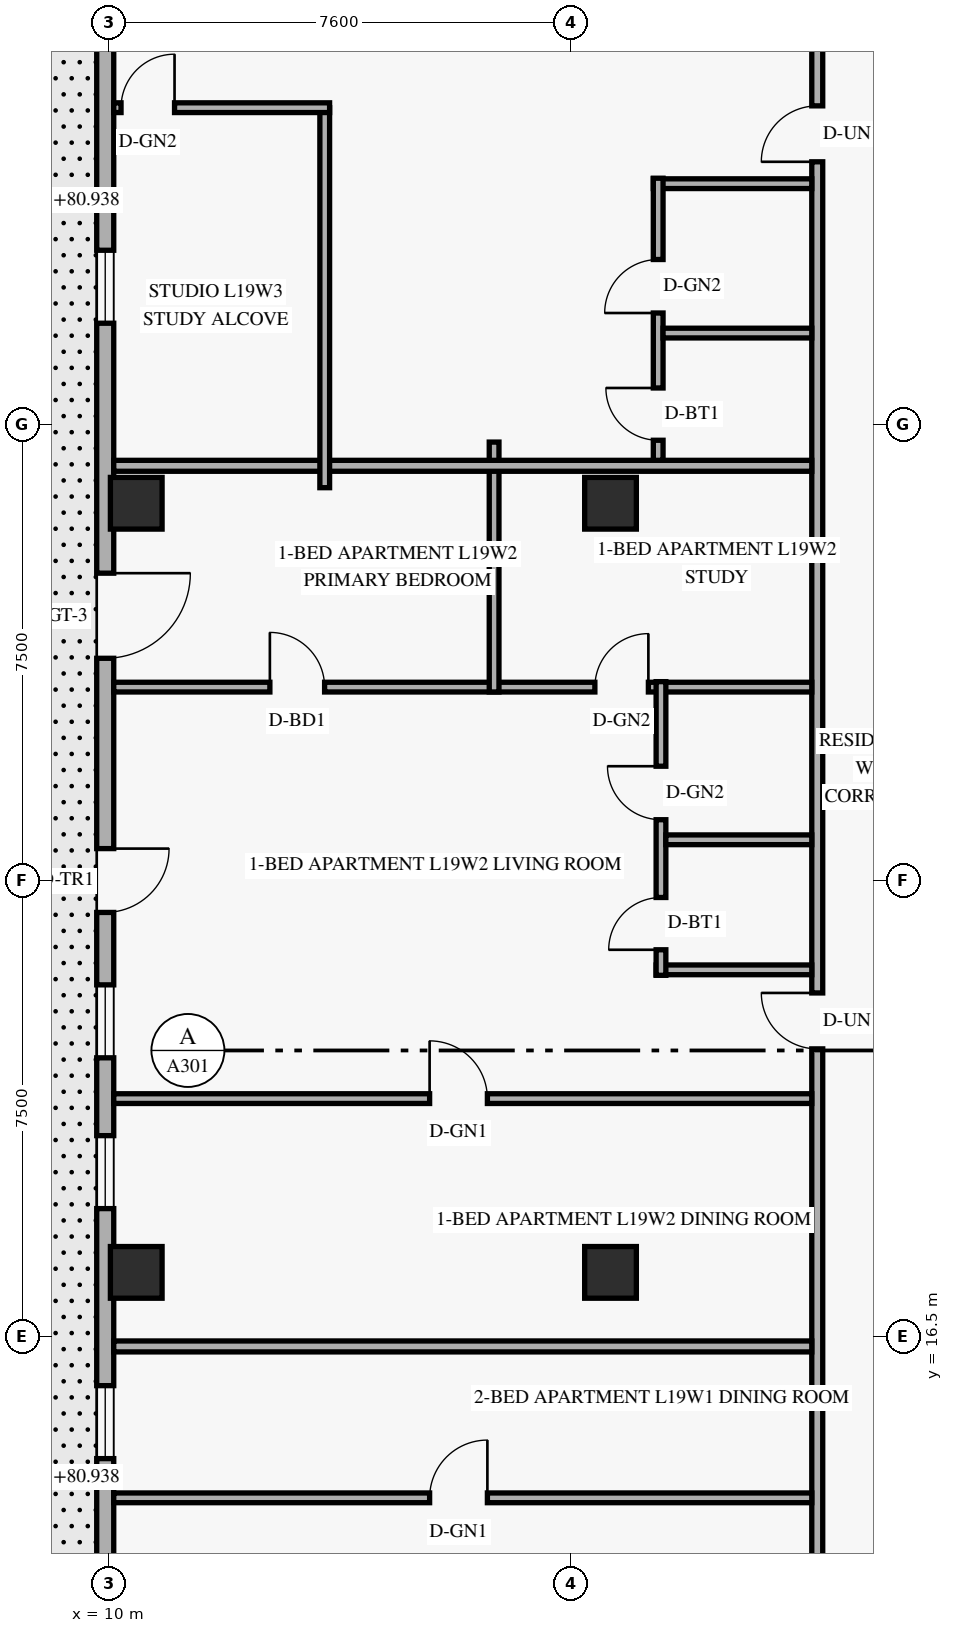
"""IFC4 building model, lengths in metres.
Left out: names, types, materials, properties, quantities, classifications, styles, units other than length and angle.
Written with IfcOpenShell. Run it as: python <this file> out.ifc"""

import sys

from ifc_helpers import new_model, si_unit, direction, frame, frame_2d, origin, origin_2d, place, context, subcontext, project, spatial, rectangle, extrude, element, fill, save


model = new_model("IFC4")
c1 = context("Model", 3, precision=1e-05, world=origin(), true_north=direction((0.0, 1.0)))
c2 = subcontext(c1, "Body", "Model", "MODEL_VIEW")
j1 = project(units=[si_unit("LENGTHUNIT", "METRE"), si_unit("PLANEANGLEUNIT", "RADIAN")], contexts=[c1])
p1 = place(None, origin())
s1 = spatial("IfcSite", under=j1, at=p1, CompositionType="ELEMENT")
p2 = place(p1, origin())
s2 = spatial("IfcBuilding", under=s1, at=p2, CompositionType="ELEMENT")
p3 = place(p2, frame((0.0, 0.0, 76.8)))
s3 = spatial("IfcBuildingStorey", under=s2, at=p3, CompositionType="ELEMENT", Elevation=76.8)
for number, where, z_axis, x_axis in (
    (1, (10.45, 17.55, 0.0), (0.0, 0.0, 1.0), (1.0, 0.0, 0.0)),
    (2, (10.45, 30.2, 0.0), (0.0, 0.0, 1.0), (1.0, 0.0, 0.0)),
    (3, (18.25, 17.55, 0.0), (0.0, 0.0, 1.0), (1.0, 0.0, 0.0)),
    (4, (18.25, 30.2, 0.0), (0.0, 0.0, 1.0), (1.0, 0.0, 0.0)),
):
    element("IfcColumn", number, at=place(p3, frame(where, z_axis=z_axis, x_axis=x_axis)), inside=s3, PredefinedType="COLUMN", context=c2, shape_type="SweptSolid", body=[
        extrude(rectangle(XDim=0.85, YDim=0.85, at=origin_2d()), origin(), (0.0, 0.0, 1.0), 3.6),
    ])
p4 = place(p3, frame((9.94, 41.68, 0.0), z_axis=(0.0, 0.0, 1.0), x_axis=(0.0, -1.0, 0.0)))
e5 = element("IfcWall", 5, at=p4, inside=s3, PredefinedType="SOLIDWALL", context=c2, shape_type="SweptSolid", body=[
    extrude(rectangle(XDim=35.36, YDim=0.28, at=frame_2d((17.68, 0.0))), origin(), (0.0, 0.0, 1.0), 3.36),
])
p5 = place(p4, frame((17.16, 0.0, 0.0)))
e6 = element("IfcOpeningElement", 6, at=p5, cuts=e5, PredefinedType="OPENING", context=c2, shape_type="SweptSolid", body=[
    extrude(rectangle(XDim=1.05, YDim=2.15, at=frame_2d((0.525, 1.075))), frame((0.0, 0.15, 0.0), z_axis=(0.0, -1.0, 0.0), x_axis=(1.0, 0.0, 0.0)), (0.0, 0.0, 1.0), 0.3),
])
p6 = place(p4, frame((12.63, 0.0, 0.0)))
e7 = element("IfcOpeningElement", 7, at=p6, cuts=e5, PredefinedType="OPENING", context=c2, shape_type="SweptSolid", body=[
    extrude(rectangle(XDim=1.4, YDim=2.15, at=frame_2d((0.7, 1.075))), frame((0.0, 0.15, 0.0), z_axis=(0.0, -1.0, 0.0), x_axis=(1.0, 0.0, 0.0)), (0.0, 0.0, 1.0), 0.3),
])
p7 = place(p4, frame((29.314, 0.0, 0.85)))
e8 = element("IfcOpeningElement", 8, at=p7, cuts=e5, PredefinedType="OPENING", context=c2, shape_type="SweptSolid", body=[
    extrude(rectangle(XDim=1.2, YDim=1.5, at=frame_2d((0.6, 0.75))), frame((0.0, 0.15, 0.0), z_axis=(0.0, -1.0, 0.0), x_axis=(1.0, 0.0, 0.0)), (0.0, 0.0, 1.0), 0.3),
])
p8 = place(p4, frame((25.993, 0.0, 0.85)))
e9 = element("IfcOpeningElement", 9, at=p8, cuts=e5, PredefinedType="OPENING", context=c2, shape_type="SweptSolid", body=[
    extrude(rectangle(XDim=1.2, YDim=1.5, at=frame_2d((0.6, 0.75))), frame((0.0, 0.15, 0.0), z_axis=(0.0, -1.0, 0.0), x_axis=(1.0, 0.0, 0.0)), (0.0, 0.0, 1.0), 0.3),
])
p9 = place(p4, frame((21.881, 0.0, 0.85)))
e10 = element("IfcOpeningElement", 10, at=p9, cuts=e5, PredefinedType="OPENING", context=c2, shape_type="SweptSolid", body=[
    extrude(rectangle(XDim=1.2, YDim=1.5, at=frame_2d((0.6, 0.75))), frame((0.0, 0.15, 0.0), z_axis=(0.0, -1.0, 0.0), x_axis=(1.0, 0.0, 0.0)), (0.0, 0.0, 1.0), 0.3),
])
p10 = place(p4, frame((19.401, 0.0, 0.85)))
e11 = element("IfcOpeningElement", 11, at=p10, cuts=e5, PredefinedType="OPENING", context=c2, shape_type="SweptSolid", body=[
    extrude(rectangle(XDim=1.2, YDim=1.5, at=frame_2d((0.6, 0.75))), frame((0.0, 0.15, 0.0), z_axis=(0.0, -1.0, 0.0), x_axis=(1.0, 0.0, 0.0)), (0.0, 0.0, 1.0), 0.3),
])
p11 = place(p4, frame((7.319, 0.0, 0.85)))
e12 = element("IfcOpeningElement", 12, at=p11, cuts=e5, PredefinedType="OPENING", context=c2, shape_type="SweptSolid", body=[
    extrude(rectangle(XDim=1.2, YDim=1.5, at=frame_2d((0.6, 0.75))), frame((0.0, 0.15, 0.0), z_axis=(0.0, -1.0, 0.0), x_axis=(1.0, 0.0, 0.0)), (0.0, 0.0, 1.0), 0.3),
])
p12 = place(p4, frame((0.805, 0.0, 0.85)))
e13 = element("IfcOpeningElement", 13, at=p12, cuts=e5, PredefinedType="OPENING", context=c2, shape_type="SweptSolid", body=[
    extrude(rectangle(XDim=1.2, YDim=1.5, at=frame_2d((0.6, 0.75))), frame((0.0, 0.15, 0.0), z_axis=(0.0, -1.0, 0.0), x_axis=(1.0, 0.0, 0.0)), (0.0, 0.0, 1.0), 0.3),
])
p13 = place(p3, frame((21.65, 2.98, 0.0), z_axis=(0.0, 0.0, 1.0), x_axis=(0.0, 1.0, 0.0)))
e14 = element("IfcWall", 14, at=p13, inside=s3, PredefinedType="STANDARD", context=c2, shape_type="SweptSolid", body=[
    extrude(rectangle(XDim=42.04, YDim=0.18, at=frame_2d((21.02, 0.0))), origin(), (0.0, 0.0, 1.0), 2.731),
])
p14 = place(p13, frame((8.984, 0.0, 0.0)))
e15 = element("IfcOpeningElement", 15, at=p14, cuts=e14, PredefinedType="OPENING", context=c2, shape_type="SweptSolid", body=[
    extrude(rectangle(XDim=0.92, YDim=2.15, at=frame_2d((0.46, 1.075))), frame((0.0, 0.1, 0.0), z_axis=(0.0, -1.0, 0.0), x_axis=(1.0, 0.0, 0.0)), (0.0, 0.0, 1.0), 0.2),
])
p15 = place(p13, frame((18.246, 0.0, 0.0)))
e16 = element("IfcOpeningElement", 16, at=p15, cuts=e14, PredefinedType="OPENING", context=c2, shape_type="SweptSolid", body=[
    extrude(rectangle(XDim=0.92, YDim=2.15, at=frame_2d((0.46, 1.075))), frame((0.0, 0.1, 0.0), z_axis=(0.0, -1.0, 0.0), x_axis=(1.0, 0.0, 0.0)), (0.0, 0.0, 1.0), 0.2),
])
p16 = place(p13, frame((32.836, 0.0, 0.0)))
e17 = element("IfcOpeningElement", 17, at=p16, cuts=e14, PredefinedType="OPENING", context=c2, shape_type="SweptSolid", body=[
    extrude(rectangle(XDim=0.92, YDim=2.15, at=frame_2d((0.46, 1.075))), frame((0.0, 0.1, 0.0), z_axis=(0.0, -1.0, 0.0), x_axis=(1.0, 0.0, 0.0)), (0.0, 0.0, 1.0), 0.2),
])
p17 = place(p3, frame((10.08, 13.842, 0.0), z_axis=(0.0, 0.0, 1.0), x_axis=(1.0, 0.0, 0.0)))
e18 = element("IfcWall", 18, at=p17, inside=s3, PredefinedType="PARTITIONING", context=c2, shape_type="SweptSolid", body=[
    extrude(rectangle(XDim=11.48, YDim=0.16, at=frame_2d((5.74, 0.0))), origin(), (0.0, 0.0, 1.0), 2.731),
])
p18 = place(p17, frame((5.195, 0.0, 0.0)))
e19 = element("IfcOpeningElement", 19, at=p18, cuts=e18, PredefinedType="OPENING", context=c2, shape_type="SweptSolid", body=[
    extrude(rectangle(XDim=0.95, YDim=2.15, at=frame_2d((0.475, 1.075))), frame((0.0, 0.09, 0.0), z_axis=(0.0, -1.0, 0.0), x_axis=(1.0, 0.0, 0.0)), (0.0, 0.0, 1.0), 0.18),
])
p19 = place(p3, frame((10.08, 16.332, 0.0), z_axis=(0.0, 0.0, 1.0), x_axis=(1.0, 0.0, 0.0)))
e20 = element("IfcWall", 20, at=p19, inside=s3, PredefinedType="PARTITIONING", context=c2, shape_type="SweptSolid", body=[
    extrude(rectangle(XDim=11.48, YDim=0.18, at=frame_2d((5.74, 0.0))), origin(), (0.0, 0.0, 1.0), 2.731),
])
p20 = place(p3, frame((10.08, 27.176, 0.0), z_axis=(0.0, 0.0, 1.0), x_axis=(1.0, 0.0, 0.0)))
e21 = element("IfcWall", 21, at=p20, inside=s3, PredefinedType="PARTITIONING", context=c2, shape_type="SweptSolid", body=[
    extrude(rectangle(XDim=11.48, YDim=0.16, at=frame_2d((5.74, 0.0))), origin(), (0.0, 0.0, 1.0), 2.731),
])
p21 = place(p20, frame((7.913, 0.0, 0.0)))
e22 = element("IfcOpeningElement", 22, at=p21, cuts=e21, PredefinedType="OPENING", context=c2, shape_type="SweptSolid", body=[
    extrude(rectangle(XDim=0.88, YDim=2.12, at=frame_2d((0.44, 1.06))), frame((0.0, 0.09, 0.0), z_axis=(0.0, -1.0, 0.0), x_axis=(1.0, 0.0, 0.0)), (0.0, 0.0, 1.0), 0.18),
])
p22 = place(p20, frame((2.568, 0.0, 0.0)))
e23 = element("IfcOpeningElement", 23, at=p22, cuts=e21, PredefinedType="OPENING", context=c2, shape_type="SweptSolid", body=[
    extrude(rectangle(XDim=0.9, YDim=2.14, at=frame_2d((0.45, 1.07))), frame((0.0, 0.09, 0.0), z_axis=(0.0, -1.0, 0.0), x_axis=(1.0, 0.0, 0.0)), (0.0, 0.0, 1.0), 0.18),
])
p23 = place(p3, frame((19.0, 22.526, 0.0), z_axis=(0.0, 0.0, 1.0), x_axis=(1.0, 0.0, 0.0)))
e24 = element("IfcWall", 24, at=p23, inside=s3, PredefinedType="PLUMBINGWALL", context=c2, shape_type="SweptSolid", body=[
    extrude(rectangle(XDim=2.56, YDim=0.16, at=frame_2d((1.28, 0.0))), origin(), (0.0, 0.0, 1.0), 3.36),
])
p24 = place(p3, frame((19.08, 22.436, 0.0), z_axis=(0.0, 0.0, 1.0), x_axis=(0.0, 1.0, 0.0)))
e25 = element("IfcWall", 25, at=p24, inside=s3, PredefinedType="PLUMBINGWALL", context=c2, shape_type="SweptSolid", body=[
    extrude(rectangle(XDim=4.83, YDim=0.16, at=frame_2d((2.415, 0.0))), origin(), (0.0, 0.0, 1.0), 3.36),
])
p25 = place(p24, frame((0.42, 0.0, 0.0)))
e26 = element("IfcOpeningElement", 26, at=p25, cuts=e25, PredefinedType="OPENING", context=c2, shape_type="SweptSolid", body=[
    extrude(rectangle(XDim=0.86, YDim=2.12, at=frame_2d((0.43, 1.06))), frame((0.0, 0.09, 0.0), z_axis=(0.0, -1.0, 0.0), x_axis=(1.0, 0.0, 0.0)), (0.0, 0.0, 1.0), 0.18),
])
p26 = place(p24, frame((2.559, 0.0, 0.0)))
e27 = element("IfcOpeningElement", 27, at=p26, cuts=e25, PredefinedType="OPENING", context=c2, shape_type="SweptSolid", body=[
    extrude(rectangle(XDim=0.88, YDim=2.12, at=frame_2d((0.44, 1.06))), frame((0.0, 0.09, 0.0), z_axis=(0.0, -1.0, 0.0), x_axis=(1.0, 0.0, 0.0)), (0.0, 0.0, 1.0), 0.18),
])
p27 = place(p3, frame((19.16, 24.665, 0.0), z_axis=(0.0, 0.0, 1.0), x_axis=(1.0, 0.0, 0.0)))
e28 = element("IfcWall", 28, at=p27, inside=s3, PredefinedType="PLUMBINGWALL", context=c2, shape_type="SweptSolid", body=[
    extrude(rectangle(XDim=2.4, YDim=0.16, at=frame_2d((1.2, 0.0))), origin(), (0.0, 0.0, 1.0), 3.36),
])
p28 = place(p3, frame((10.08, 20.408, 0.0), z_axis=(0.0, 0.0, 1.0), x_axis=(1.0, 0.0, 0.0)))
e29 = element("IfcWall", 29, at=p28, inside=s3, PredefinedType="PARTITIONING", context=c2, shape_type="SweptSolid", body=[
    extrude(rectangle(XDim=11.48, YDim=0.16, at=frame_2d((5.74, 0.0))), origin(), (0.0, 0.0, 1.0), 2.731),
])
p29 = place(p28, frame((5.195, 0.0, 0.0)))
e30 = element("IfcOpeningElement", 30, at=p29, cuts=e29, PredefinedType="OPENING", context=c2, shape_type="SweptSolid", body=[
    extrude(rectangle(XDim=0.95, YDim=2.15, at=frame_2d((0.475, 1.075))), frame((0.0, 0.09, 0.0), z_axis=(0.0, -1.0, 0.0), x_axis=(1.0, 0.0, 0.0)), (0.0, 0.0, 1.0), 0.18),
])
p30 = place(p3, frame((16.335, 27.096, 0.0), z_axis=(0.0, 0.0, 1.0), x_axis=(0.0, 1.0, 0.0)))
e31 = element("IfcWall", 31, at=p30, inside=s3, PredefinedType="PARTITIONING", context=c2, shape_type="SweptSolid", body=[
    extrude(rectangle(XDim=4.11, YDim=0.16, at=frame_2d((2.055, 0.0))), origin(), (0.0, 0.0, 1.0), 2.731),
])
p31 = place(p3, frame((10.08, 30.816, 0.0), z_axis=(0.0, 0.0, 1.0), x_axis=(1.0, 0.0, 0.0)))
e32 = element("IfcWall", 32, at=p31, inside=s3, PredefinedType="PARTITIONING", context=c2, shape_type="SweptSolid", body=[
    extrude(rectangle(XDim=11.48, YDim=0.18, at=frame_2d((5.74, 0.0))), origin(), (0.0, 0.0, 1.0), 2.731),
])
p32 = place(p3, frame((18.954, 35.456, 0.0), z_axis=(0.0, 0.0, 1.0), x_axis=(1.0, 0.0, 0.0)))
e33 = element("IfcWall", 33, at=p32, inside=s3, PredefinedType="PLUMBINGWALL", context=c2, shape_type="SweptSolid", body=[
    extrude(rectangle(XDim=2.606, YDim=0.16, at=frame_2d((1.303, 0.0))), origin(), (0.0, 0.0, 1.0), 3.36),
])
p33 = place(p3, frame((19.034, 30.906, 0.0), z_axis=(0.0, 0.0, 1.0), x_axis=(0.0, 1.0, 0.0)))
e34 = element("IfcWall", 34, at=p33, inside=s3, PredefinedType="PLUMBINGWALL", context=c2, shape_type="SweptSolid", body=[
    extrude(rectangle(XDim=4.64, YDim=0.16, at=frame_2d((2.32, 0.0))), origin(), (0.0, 0.0, 1.0), 2.988),
])
p34 = place(p33, frame((0.33, 0.0, 0.0)))
e35 = element("IfcOpeningElement", 35, at=p34, cuts=e34, PredefinedType="OPENING", context=c2, shape_type="SweptSolid", body=[
    extrude(rectangle(XDim=0.86, YDim=2.12, at=frame_2d((0.43, 1.06))), frame((0.0, 0.09, 0.0), z_axis=(0.0, -1.0, 0.0), x_axis=(1.0, 0.0, 0.0)), (0.0, 0.0, 1.0), 0.18),
])
p35 = place(p33, frame((2.423, 0.0, 0.0)))
e36 = element("IfcOpeningElement", 36, at=p35, cuts=e34, PredefinedType="OPENING", context=c2, shape_type="SweptSolid", body=[
    extrude(rectangle(XDim=0.88, YDim=2.12, at=frame_2d((0.44, 1.06))), frame((0.0, 0.09, 0.0), z_axis=(0.0, -1.0, 0.0), x_axis=(1.0, 0.0, 0.0)), (0.0, 0.0, 1.0), 0.18),
])
p36 = place(p3, frame((19.114, 32.999, 0.0), z_axis=(0.0, 0.0, 1.0), x_axis=(1.0, 0.0, 0.0)))
e37 = element("IfcWall", 37, at=p36, inside=s3, PredefinedType="PLUMBINGWALL", context=c2, shape_type="SweptSolid", body=[
    extrude(rectangle(XDim=2.446, YDim=0.16, at=frame_2d((1.223, 0.0))), origin(), (0.0, 0.0, 1.0), 3.36),
])
p37 = place(p3, frame((13.55, 30.456, 0.0), z_axis=(0.0, 0.0, 1.0), x_axis=(0.0, 1.0, 0.0)))
e38 = element("IfcWall", 38, at=p37, inside=s3, PredefinedType="PARTITIONING", context=c2, shape_type="SweptSolid", body=[
    extrude(rectangle(XDim=6.25, YDim=0.16, at=frame_2d((3.125, 0.0))), origin(), (0.0, 0.0, 1.0), 2.988),
])
p38 = place(p3, frame((10.08, 36.706, 0.0), z_axis=(0.0, 0.0, 1.0), x_axis=(1.0, 0.0, 0.0)))
e39 = element("IfcWall", 39, at=p38, inside=s3, PredefinedType="PARTITIONING", context=c2, shape_type="SweptSolid", body=[
    extrude(rectangle(XDim=3.55, YDim=0.16, at=frame_2d((1.775, 0.0))), origin(), (0.0, 0.0, 1.0), 2.809),
])
p39 = place(p38, frame((0.12, 0.0, 0.0)))
e40 = element("IfcOpeningElement", 40, at=p39, cuts=e39, PredefinedType="OPENING", context=c2, shape_type="SweptSolid", body=[
    extrude(rectangle(XDim=0.88, YDim=2.12, at=frame_2d((0.44, 1.06))), frame((0.0, 0.09, 0.0), z_axis=(0.0, -1.0, 0.0), x_axis=(1.0, 0.0, 0.0)), (0.0, 0.0, 1.0), 0.18),
])
p40 = place(p5, origin())
e41 = element("IfcDoor", 41, at=p40, inside=s3, OperationType="SINGLE_SWING_LEFT", PredefinedType="DOOR", context=c2, shape_type="SweptSolid", body=[
    extrude(rectangle(XDim=1.05, YDim=2.15, at=frame_2d((0.525, 1.075))), frame((0.0, 0.025, 0.0), z_axis=(0.0, -1.0, 0.0), x_axis=(1.0, 0.0, 0.0)), (0.0, 0.0, 1.0), 0.05),
])
fill(e6, e41)
p41 = place(p6, origin())
e42 = element("IfcDoor", 42, at=p41, inside=s3, OperationType="SINGLE_SWING_LEFT", PredefinedType="GATE", context=c2, shape_type="SweptSolid", body=[
    extrude(rectangle(XDim=1.4, YDim=2.15, at=frame_2d((0.7, 1.075))), frame((0.0, 0.025, 0.0), z_axis=(0.0, -1.0, 0.0), x_axis=(1.0, 0.0, 0.0)), (0.0, 0.0, 1.0), 0.05),
])
fill(e7, e42)
p42 = place(p8, origin())
e43 = element("IfcWindow", 43, at=p42, inside=s3, PartitioningType="SINGLE_PANEL", PredefinedType="WINDOW", context=c2, shape_type="SweptSolid", body=[
    extrude(rectangle(XDim=1.2, YDim=1.5, at=frame_2d((0.6, 0.75))), frame((0.0, 0.03, 0.0), z_axis=(0.0, -1.0, 0.0), x_axis=(1.0, 0.0, 0.0)), (0.0, 0.0, 1.0), 0.06),
])
fill(e9, e43)
p43 = place(p9, origin())
e44 = element("IfcWindow", 44, at=p43, inside=s3, PartitioningType="SINGLE_PANEL", PredefinedType="WINDOW", context=c2, shape_type="SweptSolid", body=[
    extrude(rectangle(XDim=1.2, YDim=1.5, at=frame_2d((0.6, 0.75))), frame((0.0, 0.03, 0.0), z_axis=(0.0, -1.0, 0.0), x_axis=(1.0, 0.0, 0.0)), (0.0, 0.0, 1.0), 0.06),
])
fill(e10, e44)
p44 = place(p10, origin())
e45 = element("IfcWindow", 45, at=p44, inside=s3, PartitioningType="SINGLE_PANEL", PredefinedType="WINDOW", context=c2, shape_type="SweptSolid", body=[
    extrude(rectangle(XDim=1.2, YDim=1.5, at=frame_2d((0.6, 0.75))), frame((0.0, 0.03, 0.0), z_axis=(0.0, -1.0, 0.0), x_axis=(1.0, 0.0, 0.0)), (0.0, 0.0, 1.0), 0.06),
])
fill(e11, e45)
p45 = place(p11, origin())
e46 = element("IfcWindow", 46, at=p45, inside=s3, PartitioningType="SINGLE_PANEL", PredefinedType="WINDOW", context=c2, shape_type="SweptSolid", body=[
    extrude(rectangle(XDim=1.2, YDim=1.5, at=frame_2d((0.6, 0.75))), frame((0.0, 0.03, 0.0), z_axis=(0.0, -1.0, 0.0), x_axis=(1.0, 0.0, 0.0)), (0.0, 0.0, 1.0), 0.06),
])
fill(e12, e46)
p46 = place(p18, origin())
e47 = element("IfcDoor", 47, at=p46, inside=s3, OperationType="SINGLE_SWING_RIGHT", PredefinedType="DOOR", context=c2, shape_type="SweptSolid", body=[
    extrude(rectangle(XDim=0.95, YDim=2.15, at=frame_2d((0.475, 1.075))), frame((0.0, 0.025, 0.0), z_axis=(0.0, -1.0, 0.0), x_axis=(1.0, 0.0, 0.0)), (0.0, 0.0, 1.0), 0.05),
])
fill(e19, e47)
p47 = place(p29, origin())
e48 = element("IfcDoor", 48, at=p47, inside=s3, OperationType="SINGLE_SWING_LEFT", PredefinedType="DOOR", context=c2, shape_type="SweptSolid", body=[
    extrude(rectangle(XDim=0.95, YDim=2.15, at=frame_2d((0.475, 1.075))), frame((0.0, 0.025, 0.0), z_axis=(0.0, -1.0, 0.0), x_axis=(1.0, 0.0, 0.0)), (0.0, 0.0, 1.0), 0.05),
])
fill(e30, e48)
p48 = place(p15, origin())
e49 = element("IfcDoor", 49, at=p48, inside=s3, OperationType="SINGLE_SWING_RIGHT", PredefinedType="DOOR", context=c2, shape_type="SweptSolid", body=[
    extrude(rectangle(XDim=0.92, YDim=2.15, at=frame_2d((0.46, 1.075))), frame((0.0, 0.025, 0.0), z_axis=(0.0, -1.0, 0.0), x_axis=(1.0, 0.0, 0.0)), (0.0, 0.0, 1.0), 0.05),
])
fill(e16, e49)
p49 = place(p25, origin())
e50 = element("IfcDoor", 50, at=p49, inside=s3, OperationType="SINGLE_SWING_LEFT", PredefinedType="DOOR", context=c2, shape_type="SweptSolid", body=[
    extrude(rectangle(XDim=0.86, YDim=2.12, at=frame_2d((0.43, 1.06))), frame((0.0, 0.025, 0.0), z_axis=(0.0, -1.0, 0.0), x_axis=(1.0, 0.0, 0.0)), (0.0, 0.0, 1.0), 0.05),
])
fill(e26, e50)
p50 = place(p26, origin())
e51 = element("IfcDoor", 51, at=p50, inside=s3, OperationType="SINGLE_SWING_RIGHT", PredefinedType="DOOR", context=c2, shape_type="SweptSolid", body=[
    extrude(rectangle(XDim=0.88, YDim=2.12, at=frame_2d((0.44, 1.06))), frame((0.0, 0.025, 0.0), z_axis=(0.0, -1.0, 0.0), x_axis=(1.0, 0.0, 0.0)), (0.0, 0.0, 1.0), 0.05),
])
fill(e27, e51)
p51 = place(p21, origin())
e52 = element("IfcDoor", 52, at=p51, inside=s3, OperationType="SINGLE_SWING_RIGHT", PredefinedType="DOOR", context=c2, shape_type="SweptSolid", body=[
    extrude(rectangle(XDim=0.88, YDim=2.12, at=frame_2d((0.44, 1.06))), frame((0.0, 0.025, 0.0), z_axis=(0.0, -1.0, 0.0), x_axis=(1.0, 0.0, 0.0)), (0.0, 0.0, 1.0), 0.05),
])
fill(e22, e52)
p52 = place(p22, origin())
e53 = element("IfcDoor", 53, at=p52, inside=s3, OperationType="SINGLE_SWING_LEFT", PredefinedType="DOOR", context=c2, shape_type="SweptSolid", body=[
    extrude(rectangle(XDim=0.9, YDim=2.14, at=frame_2d((0.45, 1.07))), frame((0.0, 0.025, 0.0), z_axis=(0.0, -1.0, 0.0), x_axis=(1.0, 0.0, 0.0)), (0.0, 0.0, 1.0), 0.05),
])
fill(e23, e53)
p53 = place(p39, origin())
e54 = element("IfcDoor", 54, at=p53, inside=s3, OperationType="SINGLE_SWING_RIGHT", PredefinedType="DOOR", context=c2, shape_type="SweptSolid", body=[
    extrude(rectangle(XDim=0.88, YDim=2.12, at=frame_2d((0.44, 1.06))), frame((0.0, 0.025, 0.0), z_axis=(0.0, -1.0, 0.0), x_axis=(1.0, 0.0, 0.0)), (0.0, 0.0, 1.0), 0.05),
])
fill(e40, e54)
p54 = place(p16, origin())
e55 = element("IfcDoor", 55, at=p54, inside=s3, OperationType="SINGLE_SWING_LEFT", PredefinedType="DOOR", context=c2, shape_type="SweptSolid", body=[
    extrude(rectangle(XDim=0.92, YDim=2.15, at=frame_2d((0.46, 1.075))), frame((0.0, 0.025, 0.0), z_axis=(0.0, -1.0, 0.0), x_axis=(1.0, 0.0, 0.0)), (0.0, 0.0, 1.0), 0.05),
])
fill(e17, e55)
p55 = place(p34, origin())
e56 = element("IfcDoor", 56, at=p55, inside=s3, OperationType="SINGLE_SWING_RIGHT", PredefinedType="DOOR", context=c2, shape_type="SweptSolid", body=[
    extrude(rectangle(XDim=0.86, YDim=2.12, at=frame_2d((0.43, 1.06))), frame((0.0, 0.025, 0.0), z_axis=(0.0, -1.0, 0.0), x_axis=(1.0, 0.0, 0.0)), (0.0, 0.0, 1.0), 0.05),
])
fill(e35, e56)
p56 = place(p35, origin())
e57 = element("IfcDoor", 57, at=p56, inside=s3, OperationType="SINGLE_SWING_LEFT", PredefinedType="DOOR", context=c2, shape_type="SweptSolid", body=[
    extrude(rectangle(XDim=0.88, YDim=2.12, at=frame_2d((0.44, 1.06))), frame((0.0, 0.025, 0.0), z_axis=(0.0, -1.0, 0.0), x_axis=(1.0, 0.0, 0.0)), (0.0, 0.0, 1.0), 0.05),
])
fill(e36, e57)
save(model, sys.argv[1])
